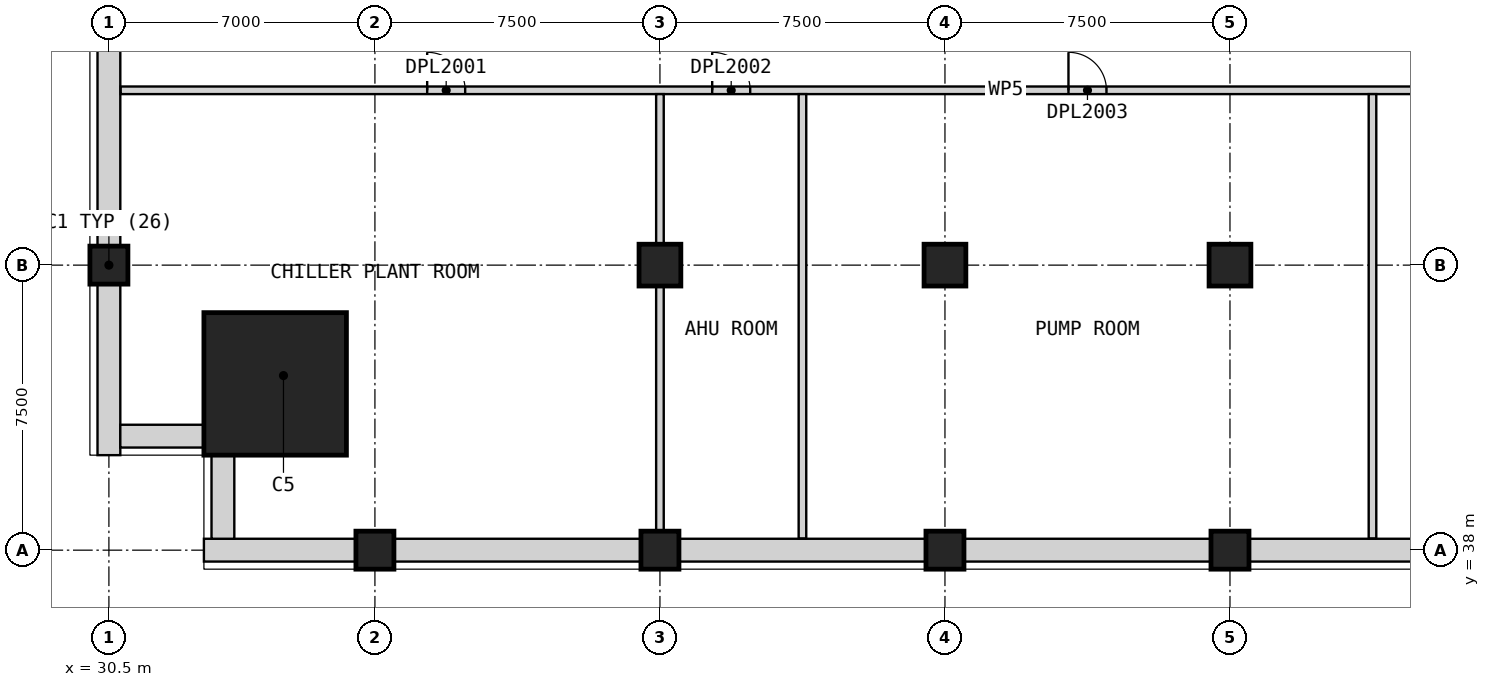
"""IFC4 building model, lengths in metres.
Left out: names, types, materials, properties, quantities, classifications, styles, units other than length and angle.
Written with IfcOpenShell. Run it as: python <this file> out.ifc"""

import sys

from ifc_helpers import new_model, si_unit, direction, frame, frame_2d, origin, origin_2d, place, context, subcontext, project, spatial, rectangle, extrude, element, fill, save


model = new_model("IFC4")
c1 = context("Model", 3, precision=1e-05, world=origin(), true_north=direction((0.0, 1.0)))
c2 = subcontext(c1, "Body", "Model", "MODEL_VIEW")
j1 = project(units=[si_unit("LENGTHUNIT", "METRE"), si_unit("PLANEANGLEUNIT", "RADIAN")], contexts=[c1])
p1 = place(None, origin())
s1 = spatial("IfcSite", under=j1, at=p1, CompositionType="ELEMENT")
p2 = place(p1, origin())
s2 = spatial("IfcBuilding", under=s1, at=p2, CompositionType="ELEMENT")
p3 = place(p2, frame((0.0, 0.0, 118.7)))
s3 = spatial("IfcBuildingStorey", under=s2, at=p3, CompositionType="ELEMENT", Elevation=118.7)
for number, where, z_axis, x_axis in (
    (1, (30.5, 45.5, 0.0), (0.0, 0.0, 1.0), (1.0, 0.0, 0.0)),
    (2, (37.5, 38.0, 0.0), (0.0, 0.0, 1.0), (1.0, 0.0, 0.0)),
    (3, (45.0, 38.0, 0.0), (0.0, 0.0, 1.0), (1.0, 0.0, 0.0)),
):
    element("IfcColumn", number, at=place(p3, frame(where, z_axis=z_axis, x_axis=x_axis)), inside=s3, PredefinedType="COLUMN", context=c2, shape_type="SweptSolid", body=[
        extrude(rectangle(XDim=1.0, YDim=1.0, at=origin_2d()), origin(), (0.0, 0.0, 1.0), 5.5),
    ])
p4 = place(p3, frame((45.0, 45.5, 0.0), z_axis=(0.0, 0.0, 1.0), x_axis=(1.0, 0.0, 0.0)))
e4 = element("IfcColumn", 4, at=p4, inside=s3, PredefinedType="COLUMN", context=c2, shape_type="SweptSolid", body=[
    extrude(rectangle(XDim=1.1, YDim=1.1, at=origin_2d()), origin(), (0.0, 0.0, 1.0), 5.5),
])
p5 = place(p3, frame((52.5, 38.0, 0.0), z_axis=(0.0, 0.0, 1.0), x_axis=(1.0, 0.0, 0.0)))
e5 = element("IfcColumn", 5, at=p5, inside=s3, PredefinedType="COLUMN", context=c2, shape_type="SweptSolid", body=[
    extrude(rectangle(XDim=1.0, YDim=1.0, at=origin_2d()), origin(), (0.0, 0.0, 1.0), 5.5),
])
p6 = place(p3, frame((52.5, 45.5, 0.0), z_axis=(0.0, 0.0, 1.0), x_axis=(1.0, 0.0, 0.0)))
e6 = element("IfcColumn", 6, at=p6, inside=s3, PredefinedType="COLUMN", context=c2, shape_type="SweptSolid", body=[
    extrude(rectangle(XDim=1.1, YDim=1.1, at=origin_2d()), origin(), (0.0, 0.0, 1.0), 5.5),
])
p7 = place(p3, frame((60.0, 38.0, 0.0), z_axis=(0.0, 0.0, 1.0), x_axis=(1.0, 0.0, 0.0)))
e7 = element("IfcColumn", 7, at=p7, inside=s3, PredefinedType="COLUMN", context=c2, shape_type="SweptSolid", body=[
    extrude(rectangle(XDim=1.0, YDim=1.0, at=origin_2d()), origin(), (0.0, 0.0, 1.0), 5.5),
])
p8 = place(p3, frame((60.0, 45.5, 0.0), z_axis=(0.0, 0.0, 1.0), x_axis=(1.0, 0.0, 0.0)))
e8 = element("IfcColumn", 8, at=p8, inside=s3, PredefinedType="COLUMN", context=c2, shape_type="SweptSolid", body=[
    extrude(rectangle(XDim=1.1, YDim=1.1, at=origin_2d()), origin(), (0.0, 0.0, 1.0), 5.5),
])
p9 = place(p3, frame((34.875, 42.375, 0.0), z_axis=(0.0, 0.0, 1.0), x_axis=(1.0, 0.0, 0.0)))
e9 = element("IfcColumn", 9, at=p9, inside=s3, PredefinedType="COLUMN", context=c2, shape_type="SweptSolid", body=[
    extrude(rectangle(XDim=3.75, YDim=3.75, at=origin_2d()), origin(), (0.079, 0.079, 0.994), 5.535),
])
p10 = place(p3, frame((33.0, 38.0, 0.0), z_axis=(0.0, 0.0, 1.0), x_axis=(1.0, 0.0, 0.0)))
e10 = element("IfcWall", 10, at=p10, inside=s3, PredefinedType="ELEMENTEDWALL", context=c2, shape_type="SweptSolid", body=[
    extrude(rectangle(XDim=4.0, YDim=0.6, at=frame_2d((2.0, 0.0))), origin(), (0.0, 0.0, 1.0), 5.2),
])
for number, where, z_axis, x_axis in (
    (11, (38.0, 38.0, 0.0), (0.0, 0.0, 1.0), (1.0, 0.0, 0.0)),
    (12, (45.5, 38.0, 0.0), (0.0, 0.0, 1.0), (1.0, 0.0, 0.0)),
    (13, (53.0, 38.0, 0.0), (0.0, 0.0, 1.0), (1.0, 0.0, 0.0)),
    (14, (60.5, 38.0, 0.0), (0.0, 0.0, 1.0), (1.0, 0.0, 0.0)),
):
    element("IfcWall", number, at=place(p3, frame(where, z_axis=z_axis, x_axis=x_axis)), inside=s3, PredefinedType="ELEMENTEDWALL", context=c2, shape_type="SweptSolid", body=[
        extrude(rectangle(XDim=6.5, YDim=0.6, at=frame_2d((3.25, 0.0))), origin(), (0.0, 0.0, 1.0), 4.75),
    ])
p11 = place(p3, frame((30.5, 52.0, 0.0), z_axis=(0.0, 0.0, 1.0), x_axis=(0.0, -1.0, 0.0)))
e15 = element("IfcWall", 15, at=p11, inside=s3, PredefinedType="ELEMENTEDWALL", context=c2, shape_type="SweptSolid", body=[
    extrude(rectangle(XDim=6.0, YDim=0.6, at=frame_2d((3.0, 0.0))), origin(), (0.0, 0.0, 1.0), 4.75),
])
p12 = place(p3, frame((30.5, 45.0, 0.0), z_axis=(0.0, 0.0, 1.0), x_axis=(0.0, -1.0, 0.0)))
e16 = element("IfcWall", 16, at=p12, inside=s3, PredefinedType="ELEMENTEDWALL", context=c2, shape_type="SweptSolid", body=[
    extrude(rectangle(XDim=4.5, YDim=0.6, at=frame_2d((2.25, 0.0))), origin(), (0.0, 0.0, 1.0), 5.2),
])
for number, where, z_axis, x_axis in (
    (17, (30.8, 41.0, 0.0), (0.0, 0.0, 1.0), (1.0, 0.0, 0.0)),
    (18, (33.5, 40.5, 0.0), (0.0, 0.0, 1.0), (0.0, -1.0, 0.0)),
):
    element("IfcWall", number, at=place(p3, frame(where, z_axis=z_axis, x_axis=x_axis)), inside=s3, PredefinedType="ELEMENTEDWALL", context=c2, shape_type="SweptSolid", body=[
        extrude(rectangle(XDim=2.2, YDim=0.6, at=frame_2d((1.1, 0.0))), origin(), (0.0, 0.0, 1.0), 5.2),
    ])
p13 = place(p3, frame((30.81, 50.1, 0.0), z_axis=(0.0, 0.0, 1.0), x_axis=(1.0, 0.0, 0.0)))
e19 = element("IfcWall", 19, at=p13, inside=s3, PredefinedType="PARTITIONING", context=c2, shape_type="SweptSolid", body=[
    extrude(rectangle(XDim=46.59, YDim=0.2, at=frame_2d((23.295, 0.0))), origin(), (0.0, 0.0, 1.0), 5.2),
])
p14 = place(p13, frame((8.065, 0.0, 0.0)))
e20 = element("IfcOpeningElement", 20, at=p14, cuts=e19, PredefinedType="OPENING", context=c2, shape_type="SweptSolid", body=[
    extrude(rectangle(XDim=1.0, YDim=2.1, at=frame_2d((0.5, 1.05))), frame((0.0, 0.11, 0.0), z_axis=(0.0, -1.0, 0.0), x_axis=(1.0, 0.0, 0.0)), (0.0, 0.0, 1.0), 0.22),
])
p15 = place(p13, frame((15.565, 0.0, 0.0)))
e21 = element("IfcOpeningElement", 21, at=p15, cuts=e19, PredefinedType="OPENING", context=c2, shape_type="SweptSolid", body=[
    extrude(rectangle(XDim=1.0, YDim=2.1, at=frame_2d((0.5, 1.05))), frame((0.0, 0.11, 0.0), z_axis=(0.0, -1.0, 0.0), x_axis=(1.0, 0.0, 0.0)), (0.0, 0.0, 1.0), 0.22),
])
p16 = place(p13, frame((24.94, 0.0, 0.0)))
e22 = element("IfcOpeningElement", 22, at=p16, cuts=e19, PredefinedType="OPENING", context=c2, shape_type="SweptSolid", body=[
    extrude(rectangle(XDim=1.0, YDim=2.1, at=frame_2d((0.5, 1.05))), frame((0.0, 0.11, 0.0), z_axis=(0.0, -1.0, 0.0), x_axis=(1.0, 0.0, 0.0)), (0.0, 0.0, 1.0), 0.22),
])
p17 = place(p13, frame((38.065, 0.0, 0.0)))
e23 = element("IfcOpeningElement", 23, at=p17, cuts=e19, PredefinedType="OPENING", context=c2, shape_type="SweptSolid", body=[
    extrude(rectangle(XDim=1.0, YDim=2.1, at=frame_2d((0.5, 1.05))), frame((0.0, 0.11, 0.0), z_axis=(0.0, -1.0, 0.0), x_axis=(1.0, 0.0, 0.0)), (0.0, 0.0, 1.0), 0.22),
])
p18 = place(p3, frame((45.0, 37.5, 0.0), z_axis=(0.0, 0.0, 1.0), x_axis=(0.0, 1.0, 0.0)))
e24 = element("IfcWall", 24, at=p18, inside=s3, PredefinedType="PARTITIONING", context=c2, shape_type="SweptSolid", body=[
    extrude(rectangle(XDim=12.5, YDim=0.2, at=frame_2d((6.25, 0.0))), origin(), (0.0, 0.0, 1.0), 5.2),
])
for number, where, z_axis, x_axis in (
    (25, (48.75, 38.31, 0.0), (0.0, 0.0, 1.0), (0.0, 1.0, 0.0)),
    (26, (63.75, 38.31, 0.0), (0.0, 0.0, 1.0), (0.0, 1.0, 0.0)),
):
    element("IfcWall", number, at=place(p3, frame(where, z_axis=z_axis, x_axis=x_axis)), inside=s3, PredefinedType="PARTITIONING", context=c2, shape_type="SweptSolid", body=[
        extrude(rectangle(XDim=11.69, YDim=0.2, at=frame_2d((5.845, 0.0))), origin(), (0.0, 0.0, 1.0), 5.2),
    ])
p19 = place(p14, origin())
e27 = element("IfcDoor", 27, at=p19, inside=s3, OperationType="SINGLE_SWING_RIGHT", PredefinedType="DOOR", context=c2, shape_type="SweptSolid", body=[
    extrude(rectangle(XDim=1.0, YDim=2.1, at=frame_2d((0.5, 1.05))), frame((0.0, 0.025, 0.0), z_axis=(0.0, -1.0, 0.0), x_axis=(1.0, 0.0, 0.0)), (0.0, 0.0, 1.0), 0.05),
])
fill(e20, e27)
p20 = place(p15, origin())
e28 = element("IfcDoor", 28, at=p20, inside=s3, OperationType="SINGLE_SWING_RIGHT", PredefinedType="DOOR", context=c2, shape_type="SweptSolid", body=[
    extrude(rectangle(XDim=1.0, YDim=2.1, at=frame_2d((0.5, 1.05))), frame((0.0, 0.025, 0.0), z_axis=(0.0, -1.0, 0.0), x_axis=(1.0, 0.0, 0.0)), (0.0, 0.0, 1.0), 0.05),
])
fill(e21, e28)
p21 = place(p16, origin())
e29 = element("IfcDoor", 29, at=p21, inside=s3, OperationType="SINGLE_SWING_RIGHT", PredefinedType="DOOR", context=c2, shape_type="SweptSolid", body=[
    extrude(rectangle(XDim=1.0, YDim=2.1, at=frame_2d((0.5, 1.05))), frame((0.0, 0.025, 0.0), z_axis=(0.0, -1.0, 0.0), x_axis=(1.0, 0.0, 0.0)), (0.0, 0.0, 1.0), 0.05),
])
fill(e22, e29)
save(model, sys.argv[1])
